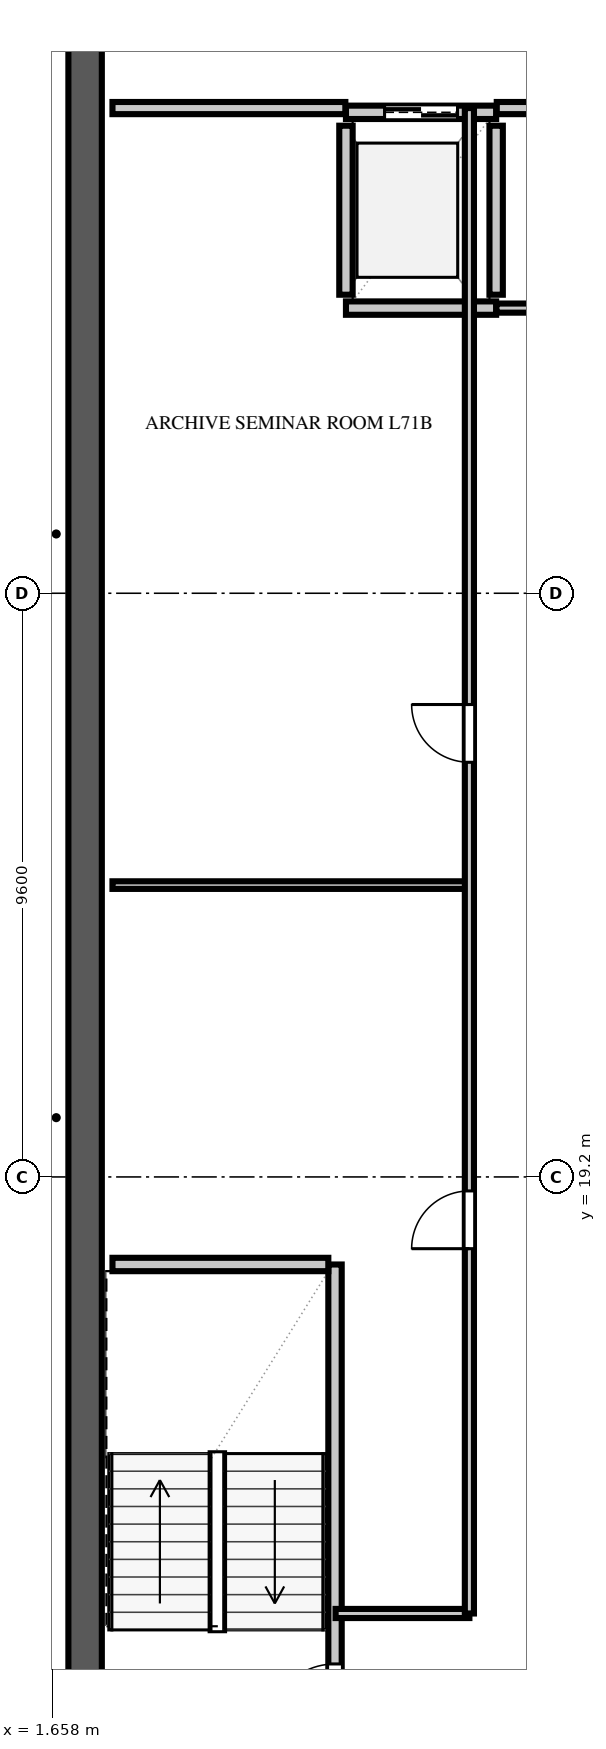
"""IFC4 building model, lengths in metres.
Left out: names, types, materials, properties, quantities, classifications, styles, units other than length and angle.
Written with IfcOpenShell. Run it as: python <this file> out.ifc"""

import sys

from ifc_helpers import new_model, si_unit, direction, frame, frame_2d, origin, place, context, subcontext, project, spatial, rectangle, extrude, element, fill, save


model = new_model("IFC4")
c1 = context("Model", 3, precision=1e-05, world=origin(), true_north=direction((0.0, 1.0)))
c2 = subcontext(c1, "Body", "Model", "MODEL_VIEW")
j1 = project(units=[si_unit("LENGTHUNIT", "METRE"), si_unit("PLANEANGLEUNIT", "RADIAN")], contexts=[c1])
p1 = place(None, origin())
s1 = spatial("IfcSite", under=j1, at=p1, CompositionType="ELEMENT")
p2 = place(p1, origin())
s2 = spatial("IfcBuilding", under=s1, at=p2, CompositionType="ELEMENT")
p3 = place(p2, frame((0.0, 0.0, 281.0)))
s3 = spatial("IfcBuildingStorey", under=s2, at=p3, CompositionType="ELEMENT", Elevation=281.0)
p4 = place(p3, frame((2.2, 9.325, 0.0), z_axis=(0.0, 0.0, 1.0), x_axis=(0.0, 1.0, 0.0)))
e1 = element("IfcWall", 1, at=p4, inside=s3, PredefinedType="SHEAR", context=c2, shape_type="SweptSolid", body=[
    extrude(rectangle(XDim=38.95, YDim=0.55, at=frame_2d((19.475, 0.0))), origin(), (0.0, 0.0, 1.0), 3.54),
])
p5 = place(p3, frame((6.31, 9.95, 0.0), z_axis=(0.0, 0.0, 1.0), x_axis=(0.0, 1.0, 0.0)))
e2 = element("IfcWall", 2, at=p5, inside=s3, PredefinedType="SOLIDWALL", context=c2, shape_type="SweptSolid", body=[
    extrude(rectangle(XDim=7.81, YDim=0.22, at=frame_2d((3.905, 0.0))), origin(), (0.0, 0.0, 1.0), 3.54),
])
p6 = place(p5, frame((0.14, 0.0, 0.0)))
e3 = element("IfcOpeningElement", 3, at=p6, cuts=e2, PredefinedType="OPENING", context=c2, shape_type="SweptSolid", body=[
    extrude(rectangle(XDim=1.1, YDim=2.2, at=frame_2d((0.55, 1.1))), frame((0.0, 0.122, 0.0), z_axis=(0.0, -1.0, 0.0), x_axis=(1.0, 0.0, 0.0)), (0.0, 0.0, 1.0), 0.244),
])
p7 = place(p3, frame((2.65, 17.76, 0.0), z_axis=(0.0, 0.0, 1.0), x_axis=(1.0, 0.0, 0.0)))
e4 = element("IfcWall", 4, at=p7, inside=s3, PredefinedType="SOLIDWALL", context=c2, shape_type="SweptSolid", body=[
    extrude(rectangle(XDim=3.55, YDim=0.22, at=frame_2d((1.775, 0.0))), origin(), (0.0, 0.0, 1.0), 3.54),
])
for number, where, z_axis, x_axis in (
    (5, (6.49, 33.71, 0.0), (0.0, 0.0, 1.0), (0.0, 1.0, 0.0)),
    (6, (8.96, 33.71, 0.0), (0.0, 0.0, 1.0), (0.0, 1.0, 0.0)),
):
    element("IfcWall", number, at=place(p3, frame(where, z_axis=z_axis, x_axis=x_axis)), inside=s3, PredefinedType="SOLIDWALL", context=c2, shape_type="SweptSolid", body=[
        extrude(rectangle(XDim=2.78, YDim=0.22, at=frame_2d((1.39, 0.0))), origin(), (0.0, 0.0, 1.0), 3.54),
    ])
p8 = place(p3, frame((6.49, 33.49, 0.0), z_axis=(0.0, 0.0, 1.0), x_axis=(1.0, 0.0, 0.0)))
e7 = element("IfcWall", 7, at=p8, inside=s3, PredefinedType="SOLIDWALL", context=c2, shape_type="SweptSolid", body=[
    extrude(rectangle(XDim=2.47, YDim=0.22, at=frame_2d((1.235, 0.0))), origin(), (0.0, 0.0, 1.0), 3.54),
])
p9 = place(p3, frame((6.49, 36.71, 0.0), z_axis=(0.0, 0.0, 1.0), x_axis=(1.0, 0.0, 0.0)))
e8 = element("IfcWall", 8, at=p9, inside=s3, PredefinedType="SOLIDWALL", context=c2, shape_type="SweptSolid", body=[
    extrude(rectangle(XDim=2.47, YDim=0.22, at=frame_2d((1.235, 0.0))), origin(), (0.0, 0.0, 1.0), 3.54),
])
p10 = place(p9, frame((0.635, 0.0, 0.0)))
e9 = element("IfcOpeningElement", 9, at=p10, cuts=e8, PredefinedType="OPENING", context=c2, shape_type="SweptSolid", body=[
    extrude(rectangle(XDim=1.2, YDim=2.2, at=frame_2d((0.6, 1.1))), frame((0.0, 0.122, 0.0), z_axis=(0.0, -1.0, 0.0), x_axis=(1.0, 0.0, 0.0)), (0.0, 0.0, 1.0), 0.244),
])
p11 = place(p3, frame((2.65, 36.78, 0.0), z_axis=(0.0, 0.0, 1.0), x_axis=(1.0, 0.0, 0.0)))
e10 = element("IfcWall", 10, at=p11, inside=s3, PredefinedType="SOLIDWALL", context=c2, shape_type="SweptSolid", body=[
    extrude(rectangle(XDim=3.83, YDim=0.2, at=frame_2d((1.915, 0.0))), origin(), (0.0, 0.0, 1.0), 3.54),
])
p12 = place(p3, frame((8.97, 36.78, 0.0), z_axis=(0.0, 0.0, 1.0), x_axis=(1.0, 0.0, 0.0)))
e11 = element("IfcWall", 11, at=p12, inside=s3, PredefinedType="SOLIDWALL", context=c2, shape_type="SweptSolid", body=[
    extrude(rectangle(XDim=1.51, YDim=0.2, at=frame_2d((0.755, 0.0))), origin(), (0.0, 0.0, 1.0), 3.54),
])
p13 = place(p3, frame((8.965, 33.49, 0.0), z_axis=(0.0, 0.0, 1.0), x_axis=(1.0, 0.0, 0.0)))
e12 = element("IfcWall", 12, at=p13, inside=s3, PredefinedType="PARTITIONING", context=c2, shape_type="SweptSolid", body=[
    extrude(rectangle(XDim=1.52, YDim=0.15, at=frame_2d((0.76, 0.0))), origin(), (0.0, 0.0, 1.0), 3.54),
])
p14 = place(p3, frame((6.32, 12.02, 0.0), z_axis=(0.0, 0.0, 1.0), x_axis=(1.0, 0.0, 0.0)))
e13 = element("IfcWall", 13, at=p14, inside=s3, PredefinedType="PARTITIONING", context=c2, shape_type="SweptSolid", body=[
    extrude(rectangle(XDim=2.2, YDim=0.15, at=frame_2d((1.1, 0.0))), origin(), (0.0, 0.0, 1.0), 3.54),
])
p15 = place(p3, frame((2.65, 24.0, 0.0), z_axis=(0.0, 0.0, 1.0), x_axis=(1.0, 0.0, 0.0)))
e14 = element("IfcWall", 14, at=p15, inside=s3, PredefinedType="PARTITIONING", context=c2, shape_type="SweptSolid", body=[
    extrude(rectangle(XDim=5.87, YDim=0.125, at=frame_2d((2.935, 0.0))), origin(), (0.0, 0.0, 1.0), 3.54),
])
p16 = place(p3, frame((8.52, 12.02, 0.0), z_axis=(0.0, 0.0, 1.0), x_axis=(0.0, 1.0, 0.0)))
e15 = element("IfcWall", 15, at=p16, inside=s3, PredefinedType="PARTITIONING", context=c2, shape_type="SweptSolid", body=[
    extrude(rectangle(XDim=24.76, YDim=0.15, at=frame_2d((12.38, 0.0))), origin(), (0.0, 0.0, 1.0), 3.54),
])
p17 = place(p16, frame((6.0, 0.0, 0.0)))
e16 = element("IfcOpeningElement", 16, at=p17, cuts=e15, PredefinedType="OPENING", context=c2, shape_type="SweptSolid", body=[
    extrude(rectangle(XDim=0.95, YDim=2.15, at=frame_2d((0.475, 1.075))), frame((0.0, 0.087, 0.0), z_axis=(0.0, -1.0, 0.0), x_axis=(1.0, 0.0, 0.0)), (0.0, 0.0, 1.0), 0.174),
])
p18 = place(p16, frame((14.0, 0.0, 0.0)))
e17 = element("IfcOpeningElement", 17, at=p18, cuts=e15, PredefinedType="OPENING", context=c2, shape_type="SweptSolid", body=[
    extrude(rectangle(XDim=0.95, YDim=2.15, at=frame_2d((0.475, 1.075))), frame((0.0, 0.087, 0.0), z_axis=(0.0, -1.0, 0.0), x_axis=(1.0, 0.0, 0.0)), (0.0, 0.0, 1.0), 0.174),
])
p19 = place(p6, origin())
e18 = element("IfcDoor", 18, at=p19, inside=s3, OperationType="SINGLE_SWING_LEFT", PredefinedType="DOOR", context=c2, shape_type="SweptSolid", body=[
    extrude(rectangle(XDim=1.1, YDim=2.2, at=frame_2d((0.55, 1.1))), frame((0.0, 0.025, 0.0), z_axis=(0.0, -1.0, 0.0), x_axis=(1.0, 0.0, 0.0)), (0.0, 0.0, 1.0), 0.05),
])
fill(e3, e18)
p20 = place(p10, origin())
e19 = element("IfcDoor", 19, at=p20, inside=s3, OperationType="DOUBLE_DOOR_SLIDING", PredefinedType="DOOR", context=c2, shape_type="SweptSolid", body=[
    extrude(rectangle(XDim=1.2, YDim=2.2, at=frame_2d((0.6, 1.1))), frame((0.0, 0.025, 0.0), z_axis=(0.0, -1.0, 0.0), x_axis=(1.0, 0.0, 0.0)), (0.0, 0.0, 1.0), 0.05),
])
fill(e9, e19)
p21 = place(p17, origin())
e20 = element("IfcDoor", 20, at=p21, inside=s3, OperationType="SINGLE_SWING_LEFT", PredefinedType="DOOR", context=c2, shape_type="SweptSolid", body=[
    extrude(rectangle(XDim=0.95, YDim=2.15, at=frame_2d((0.475, 1.075))), frame((0.0, 0.025, 0.0), z_axis=(0.0, -1.0, 0.0), x_axis=(1.0, 0.0, 0.0)), (0.0, 0.0, 1.0), 0.05),
])
fill(e16, e20)
p22 = place(p18, origin())
e21 = element("IfcDoor", 21, at=p22, inside=s3, OperationType="SINGLE_SWING_RIGHT", PredefinedType="DOOR", context=c2, shape_type="SweptSolid", body=[
    extrude(rectangle(XDim=0.95, YDim=2.15, at=frame_2d((0.475, 1.075))), frame((0.0, 0.025, 0.0), z_axis=(0.0, -1.0, 0.0), x_axis=(1.0, 0.0, 0.0)), (0.0, 0.0, 1.0), 0.05),
])
fill(e17, e21)
save(model, sys.argv[1])
